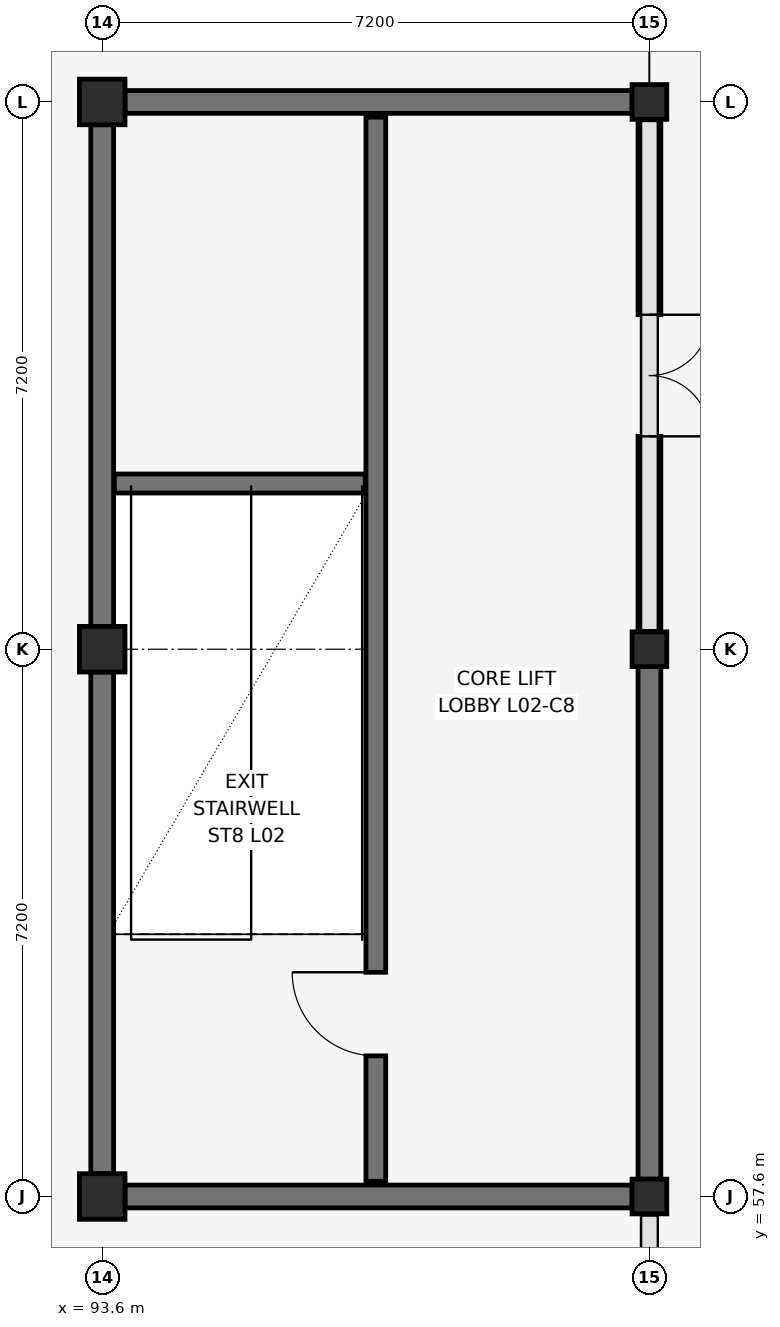
"""IFC4 building model, lengths in metres.
Left out: names, types, materials, properties, quantities, classifications, styles, units other than length and angle.
Written with IfcOpenShell. Run it as: python <this file> out.ifc"""

import sys

from ifc_helpers import new_model, si_unit, direction, frame, frame_2d, origin, origin_2d, place, context, subcontext, project, spatial, rectangle, hollow_circle, extrude, element, fill, save


model = new_model("IFC4")
c1 = context("Model", 3, precision=1e-05, world=origin(), true_north=direction((0.0, 1.0)))
c2 = subcontext(c1, "Body", "Model", "MODEL_VIEW")
j1 = project(units=[si_unit("LENGTHUNIT", "METRE"), si_unit("PLANEANGLEUNIT", "RADIAN")], contexts=[c1])
p1 = place(None, origin())
s1 = spatial("IfcSite", under=j1, at=p1, CompositionType="ELEMENT")
p2 = place(p1, origin())
s2 = spatial("IfcBuilding", under=s1, at=p2, CompositionType="ELEMENT")
p3 = place(p2, frame((0.0, 0.0, 10.2)))
s3 = spatial("IfcBuildingStorey", under=s2, at=p3, CompositionType="ELEMENT", Elevation=10.2)
for number, where, z_axis, x_axis in (
    (1, (93.6, 57.6, 0.0), (0.0, 0.0, 1.0), (1.0, 0.0, 0.0)),
    (2, (93.6, 64.8, 0.0), (0.0, 0.0, 1.0), (1.0, 0.0, 0.0)),
    (3, (93.6, 72.0, 0.0), (0.0, 0.0, 1.0), (1.0, 0.0, 0.0)),
):
    element("IfcColumn", number, at=place(p3, frame(where, z_axis=z_axis, x_axis=x_axis)), inside=s3, PredefinedType="COLUMN", context=c2, shape_type="SweptSolid", body=[
        extrude(rectangle(XDim=0.6, YDim=0.6, at=origin_2d()), origin(), (0.0, 0.0, 1.0), 4.8),
    ])
for number, where, z_axis, x_axis in (
    (4, (100.8, 57.6, 0.0), (0.0, 0.0, 1.0), (1.0, 0.0, 0.0)),
    (5, (100.8, 64.8, 0.0), (0.0, 0.0, 1.0), (1.0, 0.0, 0.0)),
    (6, (100.8, 72.0, 0.0), (0.0, 0.0, 1.0), (1.0, 0.0, 0.0)),
):
    element("IfcColumn", number, at=place(p3, frame(where, z_axis=z_axis, x_axis=x_axis)), inside=s3, PredefinedType="COLUMN", context=c2, shape_type="SweptSolid", body=[
        extrude(hollow_circle(Radius=0.229, WallThickness=0.02, at=origin_2d()), origin(), (0.0, 0.0, 1.0), 6.0),
    ])
for number, where, z_axis, x_axis in (
    (7, (93.9, 57.6, 0.0), (0.0, 0.0, 1.0), (1.0, 0.0, 0.0)),
    (8, (93.9, 72.0, 0.0), (0.0, 0.0, 1.0), (1.0, 0.0, 0.0)),
):
    element("IfcWall", number, at=place(p3, frame(where, z_axis=z_axis, x_axis=x_axis)), inside=s3, PredefinedType="SHEAR", context=c2, shape_type="SweptSolid", body=[
        extrude(rectangle(XDim=6.672, YDim=0.3, at=frame_2d((3.336, 0.0))), origin(), (0.0, 0.0, 1.0), 4.56),
    ])
p4 = place(p3, frame((93.6, 57.9, 0.0), z_axis=(0.0, 0.0, 1.0), x_axis=(0.0, 1.0, 0.0)))
e9 = element("IfcWall", 9, at=p4, inside=s3, PredefinedType="SHEAR", context=c2, shape_type="SweptSolid", body=[
    extrude(rectangle(XDim=6.6, YDim=0.3, at=frame_2d((3.3, 0.0))), origin(), (0.0, 0.0, 1.0), 4.56),
])
p5 = place(p3, frame((93.6, 65.1, 0.0), z_axis=(0.0, 0.0, 1.0), x_axis=(0.0, 1.0, 0.0)))
e10 = element("IfcWall", 10, at=p5, inside=s3, PredefinedType="SHEAR", context=c2, shape_type="SweptSolid", body=[
    extrude(rectangle(XDim=6.6, YDim=0.3, at=frame_2d((3.3, 0.0))), origin(), (0.0, 0.0, 1.0), 4.56),
])
p6 = place(p3, frame((100.8, 57.829, 0.0), z_axis=(0.0, 0.0, 1.0), x_axis=(0.0, 1.0, 0.0)))
e11 = element("IfcWall", 11, at=p6, inside=s3, PredefinedType="SHEAR", context=c2, shape_type="SweptSolid", body=[
    extrude(rectangle(XDim=6.743, YDim=0.3, at=frame_2d((3.372, 0.0))), origin(), (0.0, 0.0, 1.0), 4.56),
])
p7 = place(p3, frame((100.8, 65.029, 0.0), z_axis=(0.0, 0.0, 1.0), x_axis=(0.0, 1.0, 0.0)))
e12 = element("IfcWall", 12, at=p7, inside=s3, PredefinedType="SHEAR", context=c2, shape_type="SweptSolid", body=[
    extrude(rectangle(XDim=6.743, YDim=0.3, at=frame_2d((3.372, 0.0))), origin(), (0.0, 0.0, 1.0), 4.56),
])
p8 = place(p7, frame((2.572, 0.0, 0.0)))
e13 = element("IfcOpeningElement", 13, at=p8, cuts=e12, PredefinedType="OPENING", context=c2, shape_type="SweptSolid", body=[
    extrude(rectangle(XDim=1.6, YDim=2.2, at=frame_2d((0.8, 1.1))), frame((0.0, 0.165, 0.0), z_axis=(0.0, -1.0, 0.0), x_axis=(1.0, 0.0, 0.0)), (0.0, 0.0, 1.0), 0.33),
])
p9 = place(p3, frame((97.2, 57.8, 0.0), z_axis=(0.0, 0.0, 1.0), x_axis=(0.0, 1.0, 0.0)))
e14 = element("IfcWall", 14, at=p9, inside=s3, PredefinedType="SHEAR", context=c2, shape_type="SweptSolid", body=[
    extrude(rectangle(XDim=14.0, YDim=0.26, at=frame_2d((7.0, 0.0))), origin(), (0.0, 0.0, 1.0), 4.56),
])
p10 = place(p9, frame((1.65, 0.0, 0.0)))
e15 = element("IfcOpeningElement", 15, at=p10, cuts=e14, PredefinedType="OPENING", context=c2, shape_type="SweptSolid", body=[
    extrude(rectangle(XDim=1.1, YDim=2.15, at=frame_2d((0.55, 1.075))), frame((0.0, 0.145, 0.0), z_axis=(0.0, -1.0, 0.0), x_axis=(1.0, 0.0, 0.0)), (0.0, 0.0, 1.0), 0.29),
])
p11 = place(p3, frame((93.76, 66.98, 0.0), z_axis=(0.0, 0.0, 1.0), x_axis=(1.0, 0.0, 0.0)))
e16 = element("IfcWall", 16, at=p11, inside=s3, PredefinedType="SHEAR", context=c2, shape_type="SweptSolid", body=[
    extrude(rectangle(XDim=3.3, YDim=0.25, at=frame_2d((1.65, 0.0))), origin(), (0.0, 0.0, 1.0), 4.56),
])
p12 = place(p10, origin())
e17 = element("IfcDoor", 17, at=p12, inside=s3, OperationType="SINGLE_SWING_RIGHT", PredefinedType="DOOR", context=c2, shape_type="SweptSolid", body=[
    extrude(rectangle(XDim=1.1, YDim=2.15, at=frame_2d((0.55, 1.075))), frame((0.0, 0.025, 0.0), z_axis=(0.0, -1.0, 0.0), x_axis=(1.0, 0.0, 0.0)), (0.0, 0.0, 1.0), 0.05),
])
fill(e15, e17)
p13 = place(p8, frame((1.6, 0.0, 0.0), z_axis=(0.0, 0.0, 1.0), x_axis=(-1.0, 0.0, 0.0)))
e18 = element("IfcDoor", 18, at=p13, inside=s3, OperationType="DOUBLE_SWING_LEFT", PredefinedType="DOOR", context=c2, shape_type="SweptSolid", body=[
    extrude(rectangle(XDim=1.6, YDim=2.2, at=frame_2d((0.8, 1.1))), frame((0.0, 0.025, 0.0), z_axis=(0.0, -1.0, 0.0), x_axis=(1.0, 0.0, 0.0)), (0.0, 0.0, 1.0), 0.05),
])
fill(e13, e18)
save(model, sys.argv[1])
